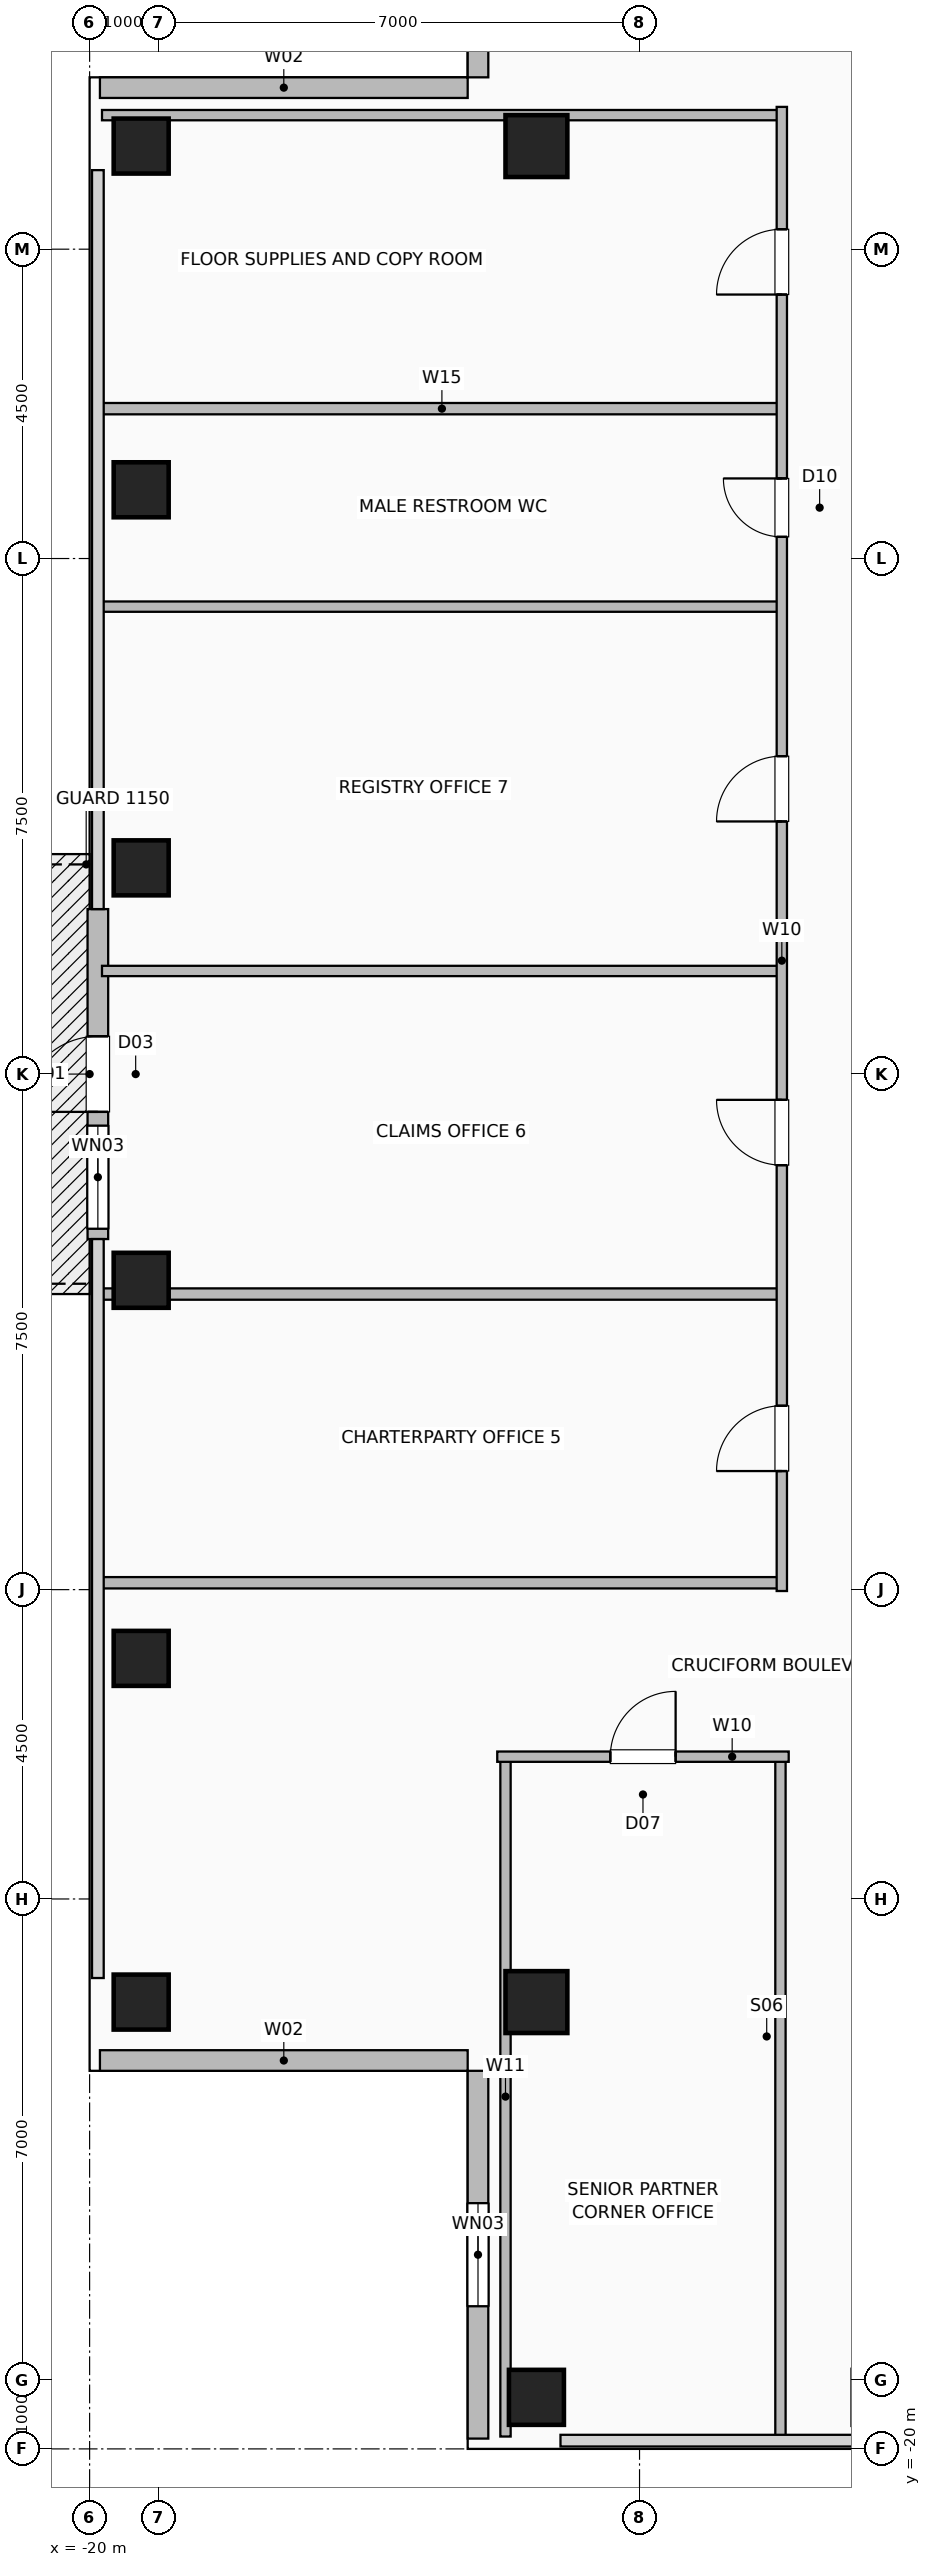
"""IFC4 building model, lengths in metres.
Left out: names, types, materials, properties, quantities, classifications, styles, units other than length and angle.
Written with IfcOpenShell. Run it as: python <this file> out.ifc"""

import sys

from ifc_helpers import new_model, si_unit, direction, frame, frame_2d, origin, origin_2d, place, context, subcontext, project, spatial, rectangle, hollow_rectangle, extrude, element, fill, save


model = new_model("IFC4")
c1 = context("Model", 3, precision=1e-05, world=origin(), true_north=direction((0.0, 1.0)))
c2 = subcontext(c1, "Body", "Model", "MODEL_VIEW")
j1 = project(units=[si_unit("LENGTHUNIT", "METRE"), si_unit("PLANEANGLEUNIT", "RADIAN")], contexts=[c1])
p1 = place(None, origin())
s1 = spatial("IfcSite", under=j1, at=p1, CompositionType="ELEMENT")
p2 = place(p1, origin())
s2 = spatial("IfcBuilding", under=s1, at=p2, CompositionType="ELEMENT")
p3 = place(p2, frame((0.0, 0.0, 177.0)))
s3 = spatial("IfcBuildingStorey", under=s2, at=p3, CompositionType="ELEMENT", Elevation=177.0)
for number, where, z_axis, x_axis in (
    (1, (-13.5, -19.25, 0.0), (0.0, 0.0, 1.0), (1.0, 0.0, 0.0)),
    (2, (-19.25, -13.5, 0.0), (0.0, 0.0, 1.0), (1.0, 0.0, 0.0)),
    (3, (-19.25, -8.5, 0.0), (0.0, 0.0, 1.0), (1.0, 0.0, 0.0)),
    (4, (-19.25, -3.0, 0.0), (0.0, 0.0, 1.0), (1.0, 0.0, 0.0)),
    (5, (-19.25, 3.0, 0.0), (0.0, 0.0, 1.0), (1.0, 0.0, 0.0)),
    (6, (-19.25, 8.5, 0.0), (0.0, 0.0, 1.0), (1.0, 0.0, 0.0)),
    (7, (-19.25, 13.5, 0.0), (0.0, 0.0, 1.0), (1.0, 0.0, 0.0)),
):
    element("IfcColumn", number, at=place(p3, frame(where, z_axis=z_axis, x_axis=x_axis)), inside=s3, PredefinedType="COLUMN", context=c2, shape_type="SweptSolid", body=[
        extrude(hollow_rectangle(XDim=0.8, YDim=0.8, WallThickness=0.04, at=origin_2d()), origin(), (0.0, 0.0, 1.0), 3.6),
    ])
for number, where, z_axis, x_axis in (
    (8, (-13.5, -13.5, 0.0), (0.0, 0.0, 1.0), (1.0, 0.0, 0.0)),
    (9, (-13.5, 13.5, 0.0), (0.0, 0.0, 1.0), (1.0, 0.0, 0.0)),
):
    element("IfcColumn", number, at=place(p3, frame(where, z_axis=z_axis, x_axis=x_axis)), inside=s3, PredefinedType="COLUMN", context=c2, shape_type="SweptSolid", body=[
        extrude(hollow_rectangle(XDim=0.9, YDim=0.9, WallThickness=0.045, at=origin_2d()), origin(), (0.0, 0.0, 1.0), 3.6),
    ])
p4 = place(p3, frame((-19.88, -2.4, 0.0), z_axis=(0.0, 0.0, 1.0), x_axis=(0.0, 1.0, 0.0)))
e10 = element("IfcWall", 10, at=p4, inside=s3, PredefinedType="SOLIDWALL", context=c2, shape_type="SweptSolid", body=[
    extrude(rectangle(XDim=4.8, YDim=0.3, at=frame_2d((2.4, 0.0))), origin(), (0.0, 0.0, 1.0), 3.36),
])
p5 = place(p4, frame((1.85, 0.0, 0.0)))
e11 = element("IfcOpeningElement", 11, at=p5, cuts=e10, PredefinedType="OPENING", context=c2, shape_type="SweptSolid", body=[
    extrude(rectangle(XDim=1.1, YDim=2.2, at=frame_2d((0.55, 1.1))), frame((0.0, 0.16, 0.0), z_axis=(0.0, -1.0, 0.0), x_axis=(1.0, 0.0, 0.0)), (0.0, 0.0, 1.0), 0.32),
])
p6 = place(p4, frame((0.15, 0.0, 0.85)))
e12 = element("IfcOpeningElement", 12, at=p6, cuts=e10, PredefinedType="OPENING", context=c2, shape_type="SweptSolid", body=[
    extrude(rectangle(XDim=1.5, YDim=1.8, at=frame_2d((0.75, 0.9))), frame((0.0, 0.16, 0.0), z_axis=(0.0, -1.0, 0.0), x_axis=(1.0, 0.0, 0.0)), (0.0, 0.0, 1.0), 0.32),
])
p7 = place(p3, frame((-14.35, -19.85, 0.0), z_axis=(0.0, 0.0, 1.0), x_axis=(0.0, 1.0, 0.0)))
e13 = element("IfcWall", 13, at=p7, inside=s3, PredefinedType="SOLIDWALL", context=c2, shape_type="SweptSolid", body=[
    extrude(rectangle(XDim=5.35, YDim=0.3, at=frame_2d((2.675, 0.0))), origin(), (0.0, 0.0, 1.0), 3.36),
])
p8 = place(p7, frame((1.925, 0.0, 0.9)))
e14 = element("IfcOpeningElement", 14, at=p8, cuts=e13, PredefinedType="OPENING", context=c2, shape_type="SweptSolid", body=[
    extrude(rectangle(XDim=1.5, YDim=1.8, at=frame_2d((0.75, 0.9))), frame((0.0, 0.16, 0.0), z_axis=(0.0, -1.0, 0.0), x_axis=(1.0, 0.0, 0.0)), (0.0, 0.0, 1.0), 0.32),
])
p9 = place(p3, frame((-19.85, -14.35, 0.0), z_axis=(0.0, 0.0, 1.0), x_axis=(1.0, 0.0, 0.0)))
e15 = element("IfcWall", 15, at=p9, inside=s3, PredefinedType="SOLIDWALL", context=c2, shape_type="SweptSolid", body=[
    extrude(rectangle(XDim=5.35, YDim=0.3, at=frame_2d((2.675, 0.0))), origin(), (0.0, 0.0, 1.0), 3.36),
])
p10 = place(p3, frame((-14.35, 19.85, 0.0), z_axis=(0.0, 0.0, 1.0), x_axis=(0.0, -1.0, 0.0)))
e16 = element("IfcWall", 16, at=p10, inside=s3, PredefinedType="SOLIDWALL", context=c2, shape_type="SweptSolid", body=[
    extrude(rectangle(XDim=5.35, YDim=0.3, at=frame_2d((2.675, 0.0))), origin(), (0.0, 0.0, 1.0), 3.36),
])
p11 = place(p10, frame((1.925, 0.0, 0.9)))
e17 = element("IfcOpeningElement", 17, at=p11, cuts=e16, PredefinedType="OPENING", context=c2, shape_type="SweptSolid", body=[
    extrude(rectangle(XDim=1.5, YDim=1.8, at=frame_2d((0.75, 0.9))), frame((0.0, 0.16, 0.0), z_axis=(0.0, -1.0, 0.0), x_axis=(1.0, 0.0, 0.0)), (0.0, 0.0, 1.0), 0.32),
])
p12 = place(p3, frame((-19.85, 14.35, 0.0), z_axis=(0.0, 0.0, 1.0), x_axis=(1.0, 0.0, 0.0)))
e18 = element("IfcWall", 18, at=p12, inside=s3, PredefinedType="SOLIDWALL", context=c2, shape_type="SweptSolid", body=[
    extrude(rectangle(XDim=5.35, YDim=0.3, at=frame_2d((2.675, 0.0))), origin(), (0.0, 0.0, 1.0), 3.36),
])
for number, where, z_axis, x_axis in (
    (19, (-13.95, -19.82, 0.0), (0.0, 0.0, 1.0), (0.0, 1.0, 0.0)),
    (20, (-9.95, -19.82, 0.0), (0.0, 0.0, 1.0), (0.0, 1.0, 0.0)),
):
    element("IfcWall", number, at=place(p3, frame(where, z_axis=z_axis, x_axis=x_axis)), inside=s3, PredefinedType="PARTITIONING", context=c2, shape_type="SweptSolid", body=[
        extrude(rectangle(XDim=9.89, YDim=0.15, at=frame_2d((4.945, 0.0))), origin(), (0.0, 0.0, 1.0), 3.36),
    ])
p13 = place(p3, frame((-14.07, -9.93, 0.0), z_axis=(0.0, 0.0, 1.0), x_axis=(1.0, 0.0, 0.0)))
e21 = element("IfcWall", 21, at=p13, inside=s3, PredefinedType="PARTITIONING", context=c2, shape_type="SweptSolid", body=[
    extrude(rectangle(XDim=4.24, YDim=0.15, at=frame_2d((2.12, 0.0))), origin(), (0.0, 0.0, 1.0), 3.36),
])
p14 = place(p13, frame((1.645, 0.0, 0.0)))
e22 = element("IfcOpeningElement", 22, at=p14, cuts=e21, PredefinedType="OPENING", context=c2, shape_type="SweptSolid", body=[
    extrude(rectangle(XDim=0.95, YDim=2.06, at=frame_2d((0.475, 1.03))), frame((0.0, 0.085, 0.0), z_axis=(0.0, -1.0, 0.0), x_axis=(1.0, 0.0, 0.0)), (0.0, 0.0, 1.0), 0.17),
])
for number, where, z_axis, x_axis in (
    (23, (-19.82, 9.68, 0.0), (0.0, 0.0, 1.0), (1.0, 0.0, 0.0)),
    (24, (-19.82, -7.4, 0.0), (0.0, 0.0, 1.0), (1.0, 0.0, 0.0)),
    (25, (-19.82, -3.2, 0.0), (0.0, 0.0, 1.0), (1.0, 0.0, 0.0)),
):
    element("IfcWall", number, at=place(p3, frame(where, z_axis=z_axis, x_axis=x_axis)), inside=s3, PredefinedType="PLUMBINGWALL", context=c2, shape_type="SweptSolid", body=[
        extrude(rectangle(XDim=9.89, YDim=0.165, at=frame_2d((4.945, 0.0))), origin(), (0.0, 0.0, 1.0), 3.36),
    ])
for number, where, z_axis, x_axis in (
    (26, (-19.82, 1.5, 0.0), (0.0, 0.0, 1.0), (1.0, 0.0, 0.0)),
    (27, (-19.82, 6.8, 0.0), (0.0, 0.0, 1.0), (1.0, 0.0, 0.0)),
    (28, (-19.82, 13.95, 0.0), (0.0, 0.0, 1.0), (1.0, 0.0, 0.0)),
):
    element("IfcWall", number, at=place(p3, frame(where, z_axis=z_axis, x_axis=x_axis)), inside=s3, PredefinedType="PARTITIONING", context=c2, shape_type="SweptSolid", body=[
        extrude(rectangle(XDim=9.89, YDim=0.15, at=frame_2d((4.945, 0.0))), origin(), (0.0, 0.0, 1.0), 3.36),
    ])
p15 = place(p3, frame((-9.93, -7.52, 0.0), z_axis=(0.0, 0.0, 1.0), x_axis=(0.0, 1.0, 0.0)))
e29 = element("IfcWall", 29, at=p15, inside=s3, PredefinedType="PARTITIONING", context=c2, shape_type="SweptSolid", body=[
    extrude(rectangle(XDim=21.59, YDim=0.15, at=frame_2d((10.795, 0.0))), origin(), (0.0, 0.0, 1.0), 3.36),
])
p16 = place(p15, frame((1.745, 0.0, 0.0)))
e30 = element("IfcOpeningElement", 30, at=p16, cuts=e29, PredefinedType="OPENING", context=c2, shape_type="SweptSolid", body=[
    extrude(rectangle(XDim=0.95, YDim=2.06, at=frame_2d((0.475, 1.03))), frame((0.0, 0.085, 0.0), z_axis=(0.0, -1.0, 0.0), x_axis=(1.0, 0.0, 0.0)), (0.0, 0.0, 1.0), 0.17),
])
p17 = place(p15, frame((6.195, 0.0, 0.0)))
e31 = element("IfcOpeningElement", 31, at=p17, cuts=e29, PredefinedType="OPENING", context=c2, shape_type="SweptSolid", body=[
    extrude(rectangle(XDim=0.95, YDim=2.06, at=frame_2d((0.475, 1.03))), frame((0.0, 0.085, 0.0), z_axis=(0.0, -1.0, 0.0), x_axis=(1.0, 0.0, 0.0)), (0.0, 0.0, 1.0), 0.17),
])
p18 = place(p15, frame((11.195, 0.0, 0.0)))
e32 = element("IfcOpeningElement", 32, at=p18, cuts=e29, PredefinedType="OPENING", context=c2, shape_type="SweptSolid", body=[
    extrude(rectangle(XDim=0.95, YDim=2.06, at=frame_2d((0.475, 1.03))), frame((0.0, 0.085, 0.0), z_axis=(0.0, -1.0, 0.0), x_axis=(1.0, 0.0, 0.0)), (0.0, 0.0, 1.0), 0.17),
])
p19 = place(p15, frame((15.335, 0.0, 0.0)))
e33 = element("IfcOpeningElement", 33, at=p19, cuts=e29, PredefinedType="OPENING", context=c2, shape_type="SweptSolid", body=[
    extrude(rectangle(XDim=0.85, YDim=2.05, at=frame_2d((0.425, 1.025))), frame((0.0, 0.085, 0.0), z_axis=(0.0, -1.0, 0.0), x_axis=(1.0, 0.0, 0.0)), (0.0, 0.0, 1.0), 0.17),
])
p20 = place(p15, frame((18.86, 0.0, 0.0)))
e34 = element("IfcOpeningElement", 34, at=p20, cuts=e29, PredefinedType="OPENING", context=c2, shape_type="SweptSolid", body=[
    extrude(rectangle(XDim=0.95, YDim=2.06, at=frame_2d((0.475, 1.03))), frame((0.0, 0.085, 0.0), z_axis=(0.0, -1.0, 0.0), x_axis=(1.0, 0.0, 0.0)), (0.0, 0.0, 1.0), 0.17),
])
p21 = place(p5, origin())
e35 = element("IfcDoor", 35, at=p21, inside=s3, OperationType="SINGLE_SWING_LEFT", PredefinedType="DOOR", context=c2, shape_type="SweptSolid", body=[
    extrude(rectangle(XDim=1.1, YDim=2.2, at=frame_2d((0.55, 1.1))), frame((0.0, 0.025, 0.0), z_axis=(0.0, -1.0, 0.0), x_axis=(1.0, 0.0, 0.0)), (0.0, 0.0, 1.0), 0.05),
])
fill(e11, e35)
p22 = place(p6, origin())
e36 = element("IfcWindow", 36, at=p22, inside=s3, PartitioningType="SINGLE_PANEL", PredefinedType="WINDOW", context=c2, shape_type="SweptSolid", body=[
    extrude(rectangle(XDim=1.5, YDim=1.8, at=frame_2d((0.75, 0.9))), frame((0.0, 0.03, 0.0), z_axis=(0.0, -1.0, 0.0), x_axis=(1.0, 0.0, 0.0)), (0.0, 0.0, 1.0), 0.06),
])
fill(e12, e36)
p23 = place(p8, origin())
e37 = element("IfcWindow", 37, at=p23, inside=s3, PartitioningType="SINGLE_PANEL", PredefinedType="WINDOW", context=c2, shape_type="SweptSolid", body=[
    extrude(rectangle(XDim=1.5, YDim=1.8, at=frame_2d((0.75, 0.9))), frame((0.0, 0.03, 0.0), z_axis=(0.0, -1.0, 0.0), x_axis=(1.0, 0.0, 0.0)), (0.0, 0.0, 1.0), 0.06),
])
fill(e14, e37)
p24 = place(p14, origin())
e38 = element("IfcDoor", 38, at=p24, inside=s3, OperationType="SINGLE_SWING_RIGHT", PredefinedType="DOOR", context=c2, shape_type="SweptSolid", body=[
    extrude(rectangle(XDim=0.95, YDim=2.06, at=frame_2d((0.475, 1.03))), frame((0.0, 0.025, 0.0), z_axis=(0.0, -1.0, 0.0), x_axis=(1.0, 0.0, 0.0)), (0.0, 0.0, 1.0), 0.05),
])
fill(e22, e38)
p25 = place(p16, origin())
e39 = element("IfcDoor", 39, at=p25, inside=s3, OperationType="SINGLE_SWING_LEFT", PredefinedType="DOOR", context=c2, shape_type="SweptSolid", body=[
    extrude(rectangle(XDim=0.95, YDim=2.06, at=frame_2d((0.475, 1.03))), frame((0.0, 0.025, 0.0), z_axis=(0.0, -1.0, 0.0), x_axis=(1.0, 0.0, 0.0)), (0.0, 0.0, 1.0), 0.05),
])
fill(e30, e39)
p26 = place(p17, origin())
e40 = element("IfcDoor", 40, at=p26, inside=s3, OperationType="SINGLE_SWING_RIGHT", PredefinedType="DOOR", context=c2, shape_type="SweptSolid", body=[
    extrude(rectangle(XDim=0.95, YDim=2.06, at=frame_2d((0.475, 1.03))), frame((0.0, 0.025, 0.0), z_axis=(0.0, -1.0, 0.0), x_axis=(1.0, 0.0, 0.0)), (0.0, 0.0, 1.0), 0.05),
])
fill(e31, e40)
p27 = place(p18, origin())
e41 = element("IfcDoor", 41, at=p27, inside=s3, OperationType="SINGLE_SWING_LEFT", PredefinedType="DOOR", context=c2, shape_type="SweptSolid", body=[
    extrude(rectangle(XDim=0.95, YDim=2.06, at=frame_2d((0.475, 1.03))), frame((0.0, 0.025, 0.0), z_axis=(0.0, -1.0, 0.0), x_axis=(1.0, 0.0, 0.0)), (0.0, 0.0, 1.0), 0.05),
])
fill(e32, e41)
p28 = place(p19, origin())
e42 = element("IfcDoor", 42, at=p28, inside=s3, OperationType="SINGLE_SWING_RIGHT", PredefinedType="DOOR", context=c2, shape_type="SweptSolid", body=[
    extrude(rectangle(XDim=0.85, YDim=2.05, at=frame_2d((0.425, 1.025))), frame((0.0, 0.025, 0.0), z_axis=(0.0, -1.0, 0.0), x_axis=(1.0, 0.0, 0.0)), (0.0, 0.0, 1.0), 0.05),
])
fill(e33, e42)
p29 = place(p20, origin())
e43 = element("IfcDoor", 43, at=p29, inside=s3, OperationType="SINGLE_SWING_LEFT", PredefinedType="DOOR", context=c2, shape_type="SweptSolid", body=[
    extrude(rectangle(XDim=0.95, YDim=2.06, at=frame_2d((0.475, 1.03))), frame((0.0, 0.025, 0.0), z_axis=(0.0, -1.0, 0.0), x_axis=(1.0, 0.0, 0.0)), (0.0, 0.0, 1.0), 0.05),
])
fill(e34, e43)
save(model, sys.argv[1])
